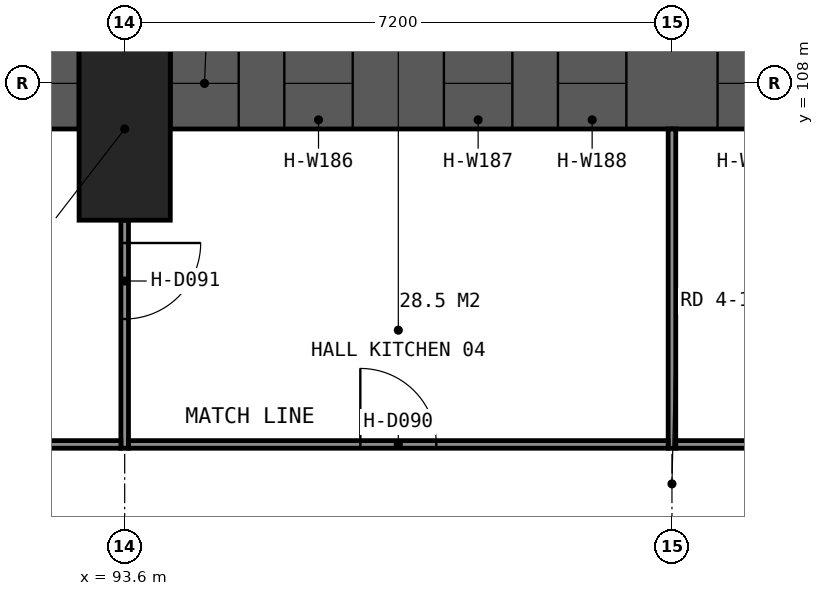
"""IFC4 building model, lengths in metres.
Left out: names, types, materials, properties, quantities, classifications, styles, units other than length and angle.
Written with IfcOpenShell. Run it as: python <this file> out.ifc"""

import sys

from ifc_helpers import new_model, si_unit, direction, frame, frame_2d, origin, origin_2d, place, context, subcontext, project, spatial, rectangle, extrude, element, fill, save


model = new_model("IFC4")
c1 = context("Model", 3, precision=1e-05, world=origin(), true_north=direction((0.0, 1.0)))
c2 = subcontext(c1, "Body", "Model", "MODEL_VIEW")
j1 = project(units=[si_unit("LENGTHUNIT", "METRE"), si_unit("PLANEANGLEUNIT", "RADIAN")], contexts=[c1])
p1 = place(None, origin())
s1 = spatial("IfcSite", under=j1, at=p1, CompositionType="ELEMENT")
p2 = place(p1, origin())
s2 = spatial("IfcBuilding", under=s1, at=p2, CompositionType="ELEMENT")
p3 = place(p2, frame((0.0, 0.0, 9.6)))
s3 = spatial("IfcBuildingStorey", under=s2, at=p3, CompositionType="ELEMENT", Elevation=9.6)
p4 = place(p3, frame((93.6, 107.4, 0.0), z_axis=(0.0, 0.0, 1.0), x_axis=(1.0, 0.0, 0.0)))
e1 = element("IfcColumn", 1, at=p4, inside=s3, PredefinedType="COLUMN", context=c2, shape_type="SweptSolid", body=[
    extrude(rectangle(XDim=1.2, YDim=2.4, at=origin_2d()), origin(), (0.0, 0.0, 1.0), 5.4),
])
p5 = place(p3, frame((79.8, 108.0, 0.0), z_axis=(0.0, 0.0, 1.0), x_axis=(1.0, 0.0, 0.0)))
e2 = element("IfcWall", 2, at=p5, inside=s3, PredefinedType="SOLIDWALL", context=c2, shape_type="SweptSolid", body=[
    extrude(rectangle(XDim=13.2, YDim=1.2, at=frame_2d((6.6, 0.0))), origin(), (0.0, 0.0, 1.0), 6.6),
])
p6 = place(p5, frame((0.0, 0.0, 1.2)))
e3 = element("IfcOpeningElement", 3, at=p6, cuts=e2, PredefinedType="OPENING", context=c2, shape_type="SweptSolid", body=[
    extrude(rectangle(XDim=0.9, YDim=4.5, at=frame_2d((0.45, 2.25))), frame((0.0, 0.61, 0.0), z_axis=(0.0, -1.0, 0.0), x_axis=(1.0, 0.0, 0.0)), (0.0, 0.0, 1.0), 1.22),
])
p7 = place(p5, frame((1.5, 0.0, 1.2)))
e4 = element("IfcOpeningElement", 4, at=p7, cuts=e2, PredefinedType="OPENING", context=c2, shape_type="SweptSolid", body=[
    extrude(rectangle(XDim=0.9, YDim=4.5, at=frame_2d((0.45, 2.25))), frame((0.0, 0.61, 0.0), z_axis=(0.0, -1.0, 0.0), x_axis=(1.0, 0.0, 0.0)), (0.0, 0.0, 1.0), 1.22),
])
p8 = place(p5, frame((3.6, 0.0, 1.2)))
e5 = element("IfcOpeningElement", 5, at=p8, cuts=e2, PredefinedType="OPENING", context=c2, shape_type="SweptSolid", body=[
    extrude(rectangle(XDim=0.9, YDim=4.5, at=frame_2d((0.45, 2.25))), frame((0.0, 0.61, 0.0), z_axis=(0.0, -1.0, 0.0), x_axis=(1.0, 0.0, 0.0)), (0.0, 0.0, 1.0), 1.22),
])
p9 = place(p5, frame((5.1, 0.0, 1.2)))
e6 = element("IfcOpeningElement", 6, at=p9, cuts=e2, PredefinedType="OPENING", context=c2, shape_type="SweptSolid", body=[
    extrude(rectangle(XDim=0.9, YDim=4.5, at=frame_2d((0.45, 2.25))), frame((0.0, 0.61, 0.0), z_axis=(0.0, -1.0, 0.0), x_axis=(1.0, 0.0, 0.0)), (0.0, 0.0, 1.0), 1.22),
])
p10 = place(p5, frame((7.2, 0.0, 1.2)))
e7 = element("IfcOpeningElement", 7, at=p10, cuts=e2, PredefinedType="OPENING", context=c2, shape_type="SweptSolid", body=[
    extrude(rectangle(XDim=0.9, YDim=4.5, at=frame_2d((0.45, 2.25))), frame((0.0, 0.61, 0.0), z_axis=(0.0, -1.0, 0.0), x_axis=(1.0, 0.0, 0.0)), (0.0, 0.0, 1.0), 1.22),
])
p11 = place(p5, frame((8.7, 0.0, 1.2)))
e8 = element("IfcOpeningElement", 8, at=p11, cuts=e2, PredefinedType="OPENING", context=c2, shape_type="SweptSolid", body=[
    extrude(rectangle(XDim=0.9, YDim=4.5, at=frame_2d((0.45, 2.25))), frame((0.0, 0.61, 0.0), z_axis=(0.0, -1.0, 0.0), x_axis=(1.0, 0.0, 0.0)), (0.0, 0.0, 1.0), 1.22),
])
p12 = place(p5, frame((10.8, 0.0, 1.2)))
e9 = element("IfcOpeningElement", 9, at=p12, cuts=e2, PredefinedType="OPENING", context=c2, shape_type="SweptSolid", body=[
    extrude(rectangle(XDim=0.9, YDim=4.5, at=frame_2d((0.45, 2.25))), frame((0.0, 0.61, 0.0), z_axis=(0.0, -1.0, 0.0), x_axis=(1.0, 0.0, 0.0)), (0.0, 0.0, 1.0), 1.22),
])
p13 = place(p5, frame((12.3, 0.0, 1.2)))
e10 = element("IfcOpeningElement", 10, at=p13, cuts=e2, PredefinedType="OPENING", context=c2, shape_type="SweptSolid", body=[
    extrude(rectangle(XDim=0.9, YDim=4.5, at=frame_2d((0.45, 2.25))), frame((0.0, 0.61, 0.0), z_axis=(0.0, -1.0, 0.0), x_axis=(1.0, 0.0, 0.0)), (0.0, 0.0, 1.0), 1.22),
])
p14 = place(p3, frame((94.2, 108.0, 0.0), z_axis=(0.0, 0.0, 1.0), x_axis=(1.0, 0.0, 0.0)))
e11 = element("IfcWall", 11, at=p14, inside=s3, PredefinedType="SOLIDWALL", context=c2, shape_type="SweptSolid", body=[
    extrude(rectangle(XDim=13.2, YDim=1.2, at=frame_2d((6.6, 0.0))), origin(), (0.0, 0.0, 1.0), 6.6),
])
p15 = place(p14, frame((0.0, 0.0, 1.2)))
e12 = element("IfcOpeningElement", 12, at=p15, cuts=e11, PredefinedType="OPENING", context=c2, shape_type="SweptSolid", body=[
    extrude(rectangle(XDim=0.9, YDim=4.5, at=frame_2d((0.45, 2.25))), frame((0.0, 0.61, 0.0), z_axis=(0.0, -1.0, 0.0), x_axis=(1.0, 0.0, 0.0)), (0.0, 0.0, 1.0), 1.22),
])
p16 = place(p14, frame((1.5, 0.0, 1.2)))
e13 = element("IfcOpeningElement", 13, at=p16, cuts=e11, PredefinedType="OPENING", context=c2, shape_type="SweptSolid", body=[
    extrude(rectangle(XDim=0.9, YDim=4.5, at=frame_2d((0.45, 2.25))), frame((0.0, 0.61, 0.0), z_axis=(0.0, -1.0, 0.0), x_axis=(1.0, 0.0, 0.0)), (0.0, 0.0, 1.0), 1.22),
])
p17 = place(p14, frame((3.6, 0.0, 1.2)))
e14 = element("IfcOpeningElement", 14, at=p17, cuts=e11, PredefinedType="OPENING", context=c2, shape_type="SweptSolid", body=[
    extrude(rectangle(XDim=0.9, YDim=4.5, at=frame_2d((0.45, 2.25))), frame((0.0, 0.61, 0.0), z_axis=(0.0, -1.0, 0.0), x_axis=(1.0, 0.0, 0.0)), (0.0, 0.0, 1.0), 1.22),
])
p18 = place(p14, frame((5.1, 0.0, 1.2)))
e15 = element("IfcOpeningElement", 15, at=p18, cuts=e11, PredefinedType="OPENING", context=c2, shape_type="SweptSolid", body=[
    extrude(rectangle(XDim=0.9, YDim=4.5, at=frame_2d((0.45, 2.25))), frame((0.0, 0.61, 0.0), z_axis=(0.0, -1.0, 0.0), x_axis=(1.0, 0.0, 0.0)), (0.0, 0.0, 1.0), 1.22),
])
p19 = place(p14, frame((7.2, 0.0, 1.2)))
e16 = element("IfcOpeningElement", 16, at=p19, cuts=e11, PredefinedType="OPENING", context=c2, shape_type="SweptSolid", body=[
    extrude(rectangle(XDim=0.9, YDim=4.5, at=frame_2d((0.45, 2.25))), frame((0.0, 0.61, 0.0), z_axis=(0.0, -1.0, 0.0), x_axis=(1.0, 0.0, 0.0)), (0.0, 0.0, 1.0), 1.22),
])
p20 = place(p14, frame((8.7, 0.0, 1.2)))
e17 = element("IfcOpeningElement", 17, at=p20, cuts=e11, PredefinedType="OPENING", context=c2, shape_type="SweptSolid", body=[
    extrude(rectangle(XDim=0.9, YDim=4.5, at=frame_2d((0.45, 2.25))), frame((0.0, 0.61, 0.0), z_axis=(0.0, -1.0, 0.0), x_axis=(1.0, 0.0, 0.0)), (0.0, 0.0, 1.0), 1.22),
])
p21 = place(p14, frame((10.8, 0.0, 1.2)))
e18 = element("IfcOpeningElement", 18, at=p21, cuts=e11, PredefinedType="OPENING", context=c2, shape_type="SweptSolid", body=[
    extrude(rectangle(XDim=0.9, YDim=4.5, at=frame_2d((0.45, 2.25))), frame((0.0, 0.61, 0.0), z_axis=(0.0, -1.0, 0.0), x_axis=(1.0, 0.0, 0.0)), (0.0, 0.0, 1.0), 1.22),
])
p22 = place(p14, frame((12.3, 0.0, 1.2)))
e19 = element("IfcOpeningElement", 19, at=p22, cuts=e11, PredefinedType="OPENING", context=c2, shape_type="SweptSolid", body=[
    extrude(rectangle(XDim=0.9, YDim=4.5, at=frame_2d((0.45, 2.25))), frame((0.0, 0.61, 0.0), z_axis=(0.0, -1.0, 0.0), x_axis=(1.0, 0.0, 0.0)), (0.0, 0.0, 1.0), 1.22),
])
p23 = place(p3, frame((93.6, 106.2, 0.0), z_axis=(0.0, 0.0, 1.0), x_axis=(0.0, -1.0, 0.0)))
e20 = element("IfcWall", 20, at=p23, inside=s3, PredefinedType="PARTITIONING", context=c2, shape_type="SweptSolid", body=[
    extrude(rectangle(XDim=3.0, YDim=0.1, at=frame_2d((1.5, 0.0))), origin(), (0.0, 0.0, 1.0), 4.7),
])
p24 = place(p23, frame((0.3, 0.0, 0.0)))
e21 = element("IfcOpeningElement", 21, at=p24, cuts=e20, PredefinedType="OPENING", context=c2, shape_type="SweptSolid", body=[
    extrude(rectangle(XDim=1.0, YDim=2.1, at=frame_2d((0.5, 1.05))), frame((0.0, 0.06, 0.0), z_axis=(0.0, -1.0, 0.0), x_axis=(1.0, 0.0, 0.0)), (0.0, 0.0, 1.0), 0.12),
])
p25 = place(p3, frame((100.8, 107.4, 0.0), z_axis=(0.0, 0.0, 1.0), x_axis=(0.0, -1.0, 0.0)))
e22 = element("IfcWall", 22, at=p25, inside=s3, PredefinedType="PARTITIONING", context=c2, shape_type="SweptSolid", body=[
    extrude(rectangle(XDim=4.2, YDim=0.1, at=frame_2d((2.1, 0.0))), origin(), (0.0, 0.0, 1.0), 4.7),
])
p26 = place(p3, frame((64.85, 103.25, 0.0), z_axis=(0.0, 0.0, 1.0), x_axis=(1.0, 0.0, 0.0)))
e23 = element("IfcWall", 23, at=p26, inside=s3, PredefinedType="PARTITIONING", context=c2, shape_type="SweptSolid", body=[
    extrude(rectangle(XDim=28.7, YDim=0.1, at=frame_2d((14.35, 0.0))), origin(), (0.0, 0.0, 1.0), 4.7),
])
p27 = place(p26, frame((13.45, 0.0, 0.0)))
e24 = element("IfcOpeningElement", 24, at=p27, cuts=e23, PredefinedType="OPENING", context=c2, shape_type="SweptSolid", body=[
    extrude(rectangle(XDim=1.8, YDim=2.1, at=frame_2d((0.9, 1.05))), frame((0.0, 0.06, 0.0), z_axis=(0.0, -1.0, 0.0), x_axis=(1.0, 0.0, 0.0)), (0.0, 0.0, 1.0), 0.12),
])
p28 = place(p3, frame((93.65, 103.25, 0.0), z_axis=(0.0, 0.0, 1.0), x_axis=(1.0, 0.0, 0.0)))
e25 = element("IfcWall", 25, at=p28, inside=s3, PredefinedType="PARTITIONING", context=c2, shape_type="SweptSolid", body=[
    extrude(rectangle(XDim=7.1, YDim=0.1, at=frame_2d((3.55, 0.0))), origin(), (0.0, 0.0, 1.0), 4.7),
])
p29 = place(p28, frame((3.05, 0.0, 0.0)))
e26 = element("IfcOpeningElement", 26, at=p29, cuts=e25, PredefinedType="OPENING", context=c2, shape_type="SweptSolid", body=[
    extrude(rectangle(XDim=1.0, YDim=2.1, at=frame_2d((0.5, 1.05))), frame((0.0, 0.06, 0.0), z_axis=(0.0, -1.0, 0.0), x_axis=(1.0, 0.0, 0.0)), (0.0, 0.0, 1.0), 0.12),
])
p30 = place(p3, frame((100.85, 103.25, 0.0), z_axis=(0.0, 0.0, 1.0), x_axis=(1.0, 0.0, 0.0)))
e27 = element("IfcWall", 27, at=p30, inside=s3, PredefinedType="PARTITIONING", context=c2, shape_type="SweptSolid", body=[
    extrude(rectangle(XDim=14.3, YDim=0.1, at=frame_2d((7.15, 0.0))), origin(), (0.0, 0.0, 1.0), 4.7),
])
p31 = place(p30, frame((6.25, 0.0, 0.0)))
e28 = element("IfcOpeningElement", 28, at=p31, cuts=e27, PredefinedType="OPENING", context=c2, shape_type="SweptSolid", body=[
    extrude(rectangle(XDim=1.8, YDim=2.1, at=frame_2d((0.9, 1.05))), frame((0.0, 0.06, 0.0), z_axis=(0.0, -1.0, 0.0), x_axis=(1.0, 0.0, 0.0)), (0.0, 0.0, 1.0), 0.12),
])
p32 = place(p29, origin())
e29 = element("IfcDoor", 29, at=p32, inside=s3, OperationType="SINGLE_SWING_LEFT", PredefinedType="DOOR", context=c2, shape_type="SweptSolid", body=[
    extrude(rectangle(XDim=1.0, YDim=2.1, at=frame_2d((0.5, 1.05))), frame((0.0, 0.025, 0.0), z_axis=(0.0, -1.0, 0.0), x_axis=(1.0, 0.0, 0.0)), (0.0, 0.0, 1.0), 0.05),
])
fill(e26, e29)
p33 = place(p24, origin())
e30 = element("IfcDoor", 30, at=p33, inside=s3, OperationType="SINGLE_SWING_LEFT", PredefinedType="DOOR", context=c2, shape_type="SweptSolid", body=[
    extrude(rectangle(XDim=1.0, YDim=2.1, at=frame_2d((0.5, 1.05))), frame((0.0, 0.025, 0.0), z_axis=(0.0, -1.0, 0.0), x_axis=(1.0, 0.0, 0.0)), (0.0, 0.0, 1.0), 0.05),
])
fill(e21, e30)
save(model, sys.argv[1])
